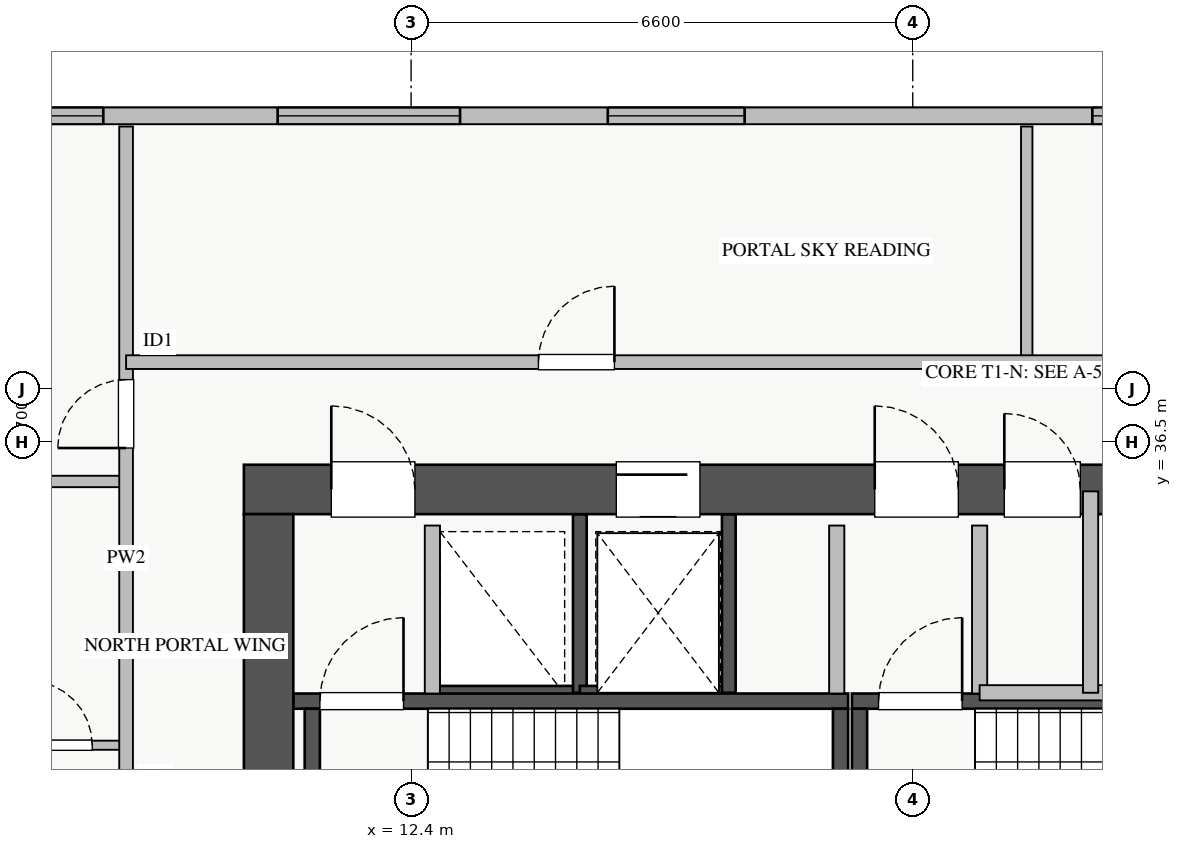
"""IFC4 building model, lengths in metres.
Left out: names, types, materials, properties, quantities, classifications, styles, units other than length and angle.
Written with IfcOpenShell. Run it as: python <this file> out.ifc"""

import sys

from ifc_helpers import new_model, si_unit, direction, frame, frame_2d, origin, place, context, subcontext, project, spatial, rectangle, extrude, source, transform, mapped, element, fill, save


model = new_model("IFC4")
c1 = context("Model", 3, precision=1e-05, world=origin(), true_north=direction((0.0, 1.0)))
c2 = subcontext(c1, "Body", "Model", "MODEL_VIEW")
j1 = project(units=[si_unit("LENGTHUNIT", "METRE"), si_unit("PLANEANGLEUNIT", "RADIAN")], contexts=[c1])
p1 = place(None, origin())
s1 = spatial("IfcSite", under=j1, at=p1, CompositionType="ELEMENT")
p2 = place(p1, origin())
s2 = spatial("IfcBuilding", under=s1, at=p2, CompositionType="ELEMENT")
p3 = place(p2, frame((0.0, 0.0, 153.5)))
s3 = spatial("IfcBuildingStorey", under=s2, at=p3, CompositionType="ELEMENT", Elevation=153.5)
p4 = place(p3, frame((12.68, 33.2, 0.0), z_axis=(0.0, 0.0, 1.0), x_axis=(1.0, 0.0, 0.0)))
e1 = element("IfcWall", 1, at=p4, inside=s3, PredefinedType="SHEAR", context=c2, shape_type="SweptSolid", body=[
    extrude(rectangle(XDim=1.94, YDim=0.18, at=frame_2d((0.97, 0.0))), origin(), (0.0, 0.0, 1.0), 3.07),
])
p5 = place(p3, frame((14.62, 33.2, 0.0), z_axis=(0.0, 0.0, 1.0), x_axis=(0.0, 1.0, 0.0)))
e2 = element("IfcWall", 2, at=p5, inside=s3, PredefinedType="SHEAR", context=c2, shape_type="SweptSolid", body=[
    extrude(rectangle(XDim=2.35, YDim=0.18, at=frame_2d((1.175, 0.0))), origin(), (0.0, 0.0, 1.0), 3.07),
])
p6 = place(p3, frame((14.62, 33.2, 0.0), z_axis=(0.0, 0.0, 1.0), x_axis=(1.0, 0.0, 0.0)))
e3 = element("IfcWall", 3, at=p6, inside=s3, PredefinedType="SHEAR", context=c2, shape_type="SweptSolid", body=[
    extrude(rectangle(XDim=1.96, YDim=0.18, at=frame_2d((0.98, 0.0))), origin(), (0.0, 0.0, 1.0), 3.07),
])
p7 = place(p3, frame((16.58, 33.2, 0.0), z_axis=(0.0, 0.0, 1.0), x_axis=(0.0, 1.0, 0.0)))
e4 = element("IfcWall", 4, at=p7, inside=s3, PredefinedType="SHEAR", context=c2, shape_type="SweptSolid", body=[
    extrude(rectangle(XDim=2.35, YDim=0.18, at=frame_2d((1.175, 0.0))), origin(), (0.0, 0.0, 1.0), 3.07),
])
p8 = place(p3, frame((10.85, 33.09, 0.0), z_axis=(0.0, 0.0, 1.0), x_axis=(1.0, 0.0, 0.0)))
e5 = element("IfcWall", 5, at=p8, inside=s3, PredefinedType="SHEAR", context=c2, shape_type="SweptSolid", body=[
    extrude(rectangle(XDim=7.3, YDim=0.2, at=frame_2d((3.65, 0.0))), origin(), (0.0, 0.0, 1.0), 3.25),
])
p9 = place(p8, frame((0.35, 0.0, 0.0)))
e6 = element("IfcOpeningElement", 6, at=p9, cuts=e5, PredefinedType="OPENING", context=c2, shape_type="SweptSolid", body=[
    extrude(rectangle(XDim=1.1, YDim=2.05, at=frame_2d((0.55, 1.025))), frame((0.0, 0.11, 0.0), z_axis=(0.0, -1.0, 0.0), x_axis=(1.0, 0.0, 0.0)), (0.0, 0.0, 1.0), 0.22),
])
for number, where, z_axis, x_axis in (
    (7, (11.1, 30.05, 0.0), (0.0, 0.0, 1.0), (0.0, 1.0, 0.0)),
    (8, (18.05, 30.05, 0.0), (0.0, 0.0, 1.0), (0.0, 1.0, 0.0)),
):
    element("IfcWall", number, at=place(p3, frame(where, z_axis=z_axis, x_axis=x_axis)), inside=s3, PredefinedType="SHEAR", context=c2, shape_type="SweptSolid", body=[
        extrude(rectangle(XDim=2.94, YDim=0.2, at=frame_2d((1.47, 0.0))), origin(), (0.0, 0.0, 1.0), 3.25),
    ])
p10 = place(p3, frame((18.2, 33.09, 0.0), z_axis=(0.0, 0.0, 1.0), x_axis=(1.0, 0.0, 0.0)))
e9 = element("IfcWall", 9, at=p10, inside=s3, PredefinedType="SHEAR", context=c2, shape_type="SweptSolid", body=[
    extrude(rectangle(XDim=7.15, YDim=0.2, at=frame_2d((3.575, 0.0))), origin(), (0.0, 0.0, 1.0), 3.25),
])
p11 = place(p10, frame((0.35, 0.0, 0.0)))
e10 = element("IfcOpeningElement", 10, at=p11, cuts=e9, PredefinedType="OPENING", context=c2, shape_type="SweptSolid", body=[
    extrude(rectangle(XDim=1.1, YDim=2.05, at=frame_2d((0.55, 1.025))), frame((0.0, 0.11, 0.0), z_axis=(0.0, -1.0, 0.0), x_axis=(1.0, 0.0, 0.0)), (0.0, 0.0, 1.0), 0.22),
])
p12 = place(p3, frame((18.3, 30.05, 0.0), z_axis=(0.0, 0.0, 1.0), x_axis=(0.0, 1.0, 0.0)))
e11 = element("IfcWall", 11, at=p12, inside=s3, PredefinedType="SHEAR", context=c2, shape_type="SweptSolid", body=[
    extrude(rectangle(XDim=2.94, YDim=0.2, at=frame_2d((1.47, 0.0))), origin(), (0.0, 0.0, 1.0), 3.25),
])
p13 = place(p3, frame((10.2, 35.875, 0.0), z_axis=(0.0, 0.0, 1.0), x_axis=(1.0, 0.0, 0.0)))
e12 = element("IfcWall", 12, at=p13, inside=s3, PredefinedType="SHEAR", context=c2, shape_type="SweptSolid", body=[
    extrude(rectangle(XDim=17.6, YDim=0.65, at=frame_2d((8.8, 0.0))), origin(), (0.0, 0.0, 1.0), 3.25),
])
p14 = place(p13, frame((1.15, 0.0, 0.0)))
e13 = element("IfcOpeningElement", 13, at=p14, cuts=e12, PredefinedType="OPENING", context=c2, shape_type="SweptSolid", body=[
    extrude(rectangle(XDim=1.1, YDim=2.05, at=frame_2d((0.55, 1.025))), frame((0.0, 0.335, 0.0), z_axis=(0.0, -1.0, 0.0), x_axis=(1.0, 0.0, 0.0)), (0.0, 0.0, 1.0), 0.67),
])
p15 = place(p13, frame((8.3, 0.0, 0.0)))
e14 = element("IfcOpeningElement", 14, at=p15, cuts=e12, PredefinedType="OPENING", context=c2, shape_type="SweptSolid", body=[
    extrude(rectangle(XDim=1.1, YDim=2.05, at=frame_2d((0.55, 1.025))), frame((0.0, 0.335, 0.0), z_axis=(0.0, -1.0, 0.0), x_axis=(1.0, 0.0, 0.0)), (0.0, 0.0, 1.0), 0.67),
])
p16 = place(p13, frame((4.9, 0.0, 0.0)))
e15 = element("IfcOpeningElement", 15, at=p16, cuts=e12, PredefinedType="OPENING", context=c2, shape_type="SweptSolid", body=[
    extrude(rectangle(XDim=1.1, YDim=2.05, at=frame_2d((0.55, 1.025))), frame((0.0, 0.335, 0.0), z_axis=(0.0, -1.0, 0.0), x_axis=(1.0, 0.0, 0.0)), (0.0, 0.0, 1.0), 0.67),
])
p17 = place(p13, frame((14.74, 0.0, 0.0)))
e16 = element("IfcOpeningElement", 16, at=p17, cuts=e12, PredefinedType="OPENING", context=c2, shape_type="SweptSolid", body=[
    extrude(rectangle(XDim=1.0, YDim=2.05, at=frame_2d((0.5, 1.025))), frame((0.0, 0.335, 0.0), z_axis=(0.0, -1.0, 0.0), x_axis=(1.0, 0.0, 0.0)), (0.0, 0.0, 1.0), 0.67),
])
p18 = place(p13, frame((10.005, 0.0, 0.0)))
e17 = element("IfcOpeningElement", 17, at=p18, cuts=e12, PredefinedType="OPENING", context=c2, shape_type="SweptSolid", body=[
    extrude(rectangle(XDim=1.0, YDim=2.05, at=frame_2d((0.5, 1.025))), frame((0.0, 0.335, 0.0), z_axis=(0.0, -1.0, 0.0), x_axis=(1.0, 0.0, 0.0)), (0.0, 0.0, 1.0), 0.67),
])
p19 = place(p13, frame((11.55, 0.0, 0.0)))
e18 = element("IfcOpeningElement", 18, at=p19, cuts=e12, PredefinedType="OPENING", context=c2, shape_type="SweptSolid", body=[
    extrude(rectangle(XDim=1.0, YDim=2.05, at=frame_2d((0.5, 1.025))), frame((0.0, 0.335, 0.0), z_axis=(0.0, -1.0, 0.0), x_axis=(1.0, 0.0, 0.0)), (0.0, 0.0, 1.0), 0.67),
])
p20 = place(p13, frame((13.215, 0.0, 0.0)))
e19 = element("IfcOpeningElement", 19, at=p20, cuts=e12, PredefinedType="OPENING", context=c2, shape_type="SweptSolid", body=[
    extrude(rectangle(XDim=1.0, YDim=2.05, at=frame_2d((0.5, 1.025))), frame((0.0, 0.335, 0.0), z_axis=(0.0, -1.0, 0.0), x_axis=(1.0, 0.0, 0.0)), (0.0, 0.0, 1.0), 0.67),
])
p21 = place(p3, frame((10.525, 29.65, 0.0), z_axis=(0.0, 0.0, 1.0), x_axis=(0.0, 1.0, 0.0)))
e20 = element("IfcWall", 20, at=p21, inside=s3, PredefinedType="SHEAR", context=c2, shape_type="SweptSolid", body=[
    extrude(rectangle(XDim=5.9, YDim=0.65, at=frame_2d((2.95, 0.0))), origin(), (0.0, 0.0, 1.0), 3.25),
])
p22 = place(p3, frame((6.55, 40.79, 0.0), z_axis=(0.0, 0.0, 1.0), x_axis=(1.0, 0.0, 0.0)))
e21 = element("IfcWall", 21, at=p22, inside=s3, PredefinedType="STANDARD", context=c2, shape_type="SweptSolid", body=[
    extrude(rectangle(XDim=24.9, YDim=0.22, at=frame_2d((12.45, 0.0))), origin(), (0.0, 0.0, 1.0), 2.61),
])
p23 = place(p22, frame((0.3, 0.0, 0.9)))
e22 = element("IfcOpeningElement", 22, at=p23, cuts=e21, PredefinedType="OPENING", context=c2, shape_type="SweptSolid", body=[
    extrude(rectangle(XDim=1.5, YDim=1.5, at=frame_2d((0.75, 0.75))), frame((0.0, 0.12, 0.0), z_axis=(0.0, -1.0, 0.0), x_axis=(1.0, 0.0, 0.0)), (0.0, 0.0, 1.0), 0.24),
])
p24 = place(p22, frame((8.438, 0.0, 0.9)))
e23 = element("IfcOpeningElement", 23, at=p24, cuts=e21, PredefinedType="OPENING", context=c2, shape_type="SweptSolid", body=[
    extrude(rectangle(XDim=1.8, YDim=1.45, at=frame_2d((0.9, 0.725))), frame((0.0, 0.12, 0.0), z_axis=(0.0, -1.0, 0.0), x_axis=(1.0, 0.0, 0.0)), (0.0, 0.0, 1.0), 0.24),
])
p25 = place(p22, frame((14.813, 0.0, 0.9)))
e24 = element("IfcOpeningElement", 24, at=p25, cuts=e21, PredefinedType="OPENING", context=c2, shape_type="SweptSolid", body=[
    extrude(rectangle(XDim=1.5, YDim=1.45, at=frame_2d((0.75, 0.725))), frame((0.0, 0.12, 0.0), z_axis=(0.0, -1.0, 0.0), x_axis=(1.0, 0.0, 0.0)), (0.0, 0.0, 1.0), 0.24),
])
p26 = place(p22, frame((20.738, 0.0, 0.9)))
e25 = element("IfcOpeningElement", 25, at=p26, cuts=e21, PredefinedType="OPENING", context=c2, shape_type="SweptSolid", body=[
    extrude(rectangle(XDim=2.1, YDim=1.48, at=frame_2d((1.05, 0.74))), frame((0.0, 0.12, 0.0), z_axis=(0.0, -1.0, 0.0), x_axis=(1.0, 0.0, 0.0)), (0.0, 0.0, 1.0), 0.24),
])
p27 = place(p22, frame((4.094, 0.0, 0.9)))
e26 = element("IfcOpeningElement", 26, at=p27, cuts=e21, PredefinedType="OPENING", context=c2, shape_type="SweptSolid", body=[
    extrude(rectangle(XDim=2.4, YDim=1.5, at=frame_2d((1.2, 0.75))), frame((0.0, 0.12, 0.0), z_axis=(0.0, -1.0, 0.0), x_axis=(1.0, 0.0, 0.0)), (0.0, 0.0, 1.0), 0.24),
])
for number, where, z_axis, x_axis in (
    (27, (12.68, 33.19, 0.0), (0.0, 0.0, 1.0), (0.0, 1.0, 0.0)),
    (28, (18.0, 33.19, 0.0), (0.0, 0.0, 1.0), (0.0, 1.0, 0.0)),
    (29, (19.88, 33.19, 0.0), (0.0, 0.0, 1.0), (0.0, 1.0, 0.0)),
):
    element("IfcWall", number, at=place(p3, frame(where, z_axis=z_axis, x_axis=x_axis)), inside=s3, PredefinedType="PARTITIONING", context=c2, shape_type="SweptSolid", body=[
        extrude(rectangle(XDim=2.21, YDim=0.2, at=frame_2d((1.105, 0.0))), origin(), (0.0, 0.0, 1.0), 3.07),
    ])
p28 = place(p3, frame((19.88, 33.2, 0.0), z_axis=(0.0, 0.0, 1.0), x_axis=(1.0, 0.0, 0.0)))
e30 = element("IfcWall", 30, at=p28, inside=s3, PredefinedType="PARTITIONING", context=c2, shape_type="SweptSolid", body=[
    extrude(rectangle(XDim=1.87, YDim=0.2, at=frame_2d((0.935, 0.0))), origin(), (0.0, 0.0, 1.0), 3.07),
])
p29 = place(p3, frame((21.34, 33.2, 0.0), z_axis=(0.0, 0.0, 1.0), x_axis=(0.0, 1.0, 0.0)))
e31 = element("IfcWall", 31, at=p29, inside=s3, PredefinedType="PARTITIONING", context=c2, shape_type="SweptSolid", body=[
    extrude(rectangle(XDim=2.65, YDim=0.2, at=frame_2d((1.325, 0.0))), origin(), (0.0, 0.0, 1.0), 3.07),
])
p30 = place(p3, frame((1.35, 32.51, 0.0), z_axis=(0.0, 0.0, 1.0), x_axis=(1.0, 0.0, 0.0)))
e32 = element("IfcWall", 32, at=p30, inside=s3, PredefinedType="PLUMBINGWALL", context=c2, shape_type="SweptSolid", body=[
    extrude(rectangle(XDim=7.3, YDim=0.12, at=frame_2d((3.65, 0.0))), origin(), (0.0, 0.0, 1.0), 3.07),
])
p31 = place(p30, frame((1.19, 0.0, 0.0)))
e33 = element("IfcOpeningElement", 33, at=p31, cuts=e32, PredefinedType="OPENING", context=c2, shape_type="SweptSolid", body=[
    extrude(rectangle(XDim=0.9, YDim=2.05, at=frame_2d((0.45, 1.025))), frame((0.0, 0.07, 0.0), z_axis=(0.0, -1.0, 0.0), x_axis=(1.0, 0.0, 0.0)), (0.0, 0.0, 1.0), 0.14),
])
p32 = place(p30, frame((3.97, 0.0, 0.0)))
e34 = element("IfcOpeningElement", 34, at=p32, cuts=e32, PredefinedType="OPENING", context=c2, shape_type="SweptSolid", body=[
    extrude(rectangle(XDim=0.9, YDim=2.05, at=frame_2d((0.45, 1.025))), frame((0.0, 0.07, 0.0), z_axis=(0.0, -1.0, 0.0), x_axis=(1.0, 0.0, 0.0)), (0.0, 0.0, 1.0), 0.14),
])
p33 = place(p30, frame((6.005, 0.0, 0.0)))
e35 = element("IfcOpeningElement", 35, at=p33, cuts=e32, PredefinedType="OPENING", context=c2, shape_type="SweptSolid", body=[
    extrude(rectangle(XDim=0.85, YDim=2.05, at=frame_2d((0.425, 1.025))), frame((0.0, 0.07, 0.0), z_axis=(0.0, -1.0, 0.0), x_axis=(1.0, 0.0, 0.0)), (0.0, 0.0, 1.0), 0.14),
])
p34 = place(p3, frame((1.35, 35.98, 0.0), z_axis=(0.0, 0.0, 1.0), x_axis=(1.0, 0.0, 0.0)))
e36 = element("IfcWall", 36, at=p34, inside=s3, PredefinedType="PARTITIONING", context=c2, shape_type="SweptSolid", body=[
    extrude(rectangle(XDim=7.3, YDim=0.15, at=frame_2d((3.65, 0.0))), origin(), (0.0, 0.0, 1.0), 3.07),
])
p35 = place(p3, frame((8.65, 29.3, 0.0), z_axis=(0.0, 0.0, 1.0), x_axis=(0.0, 1.0, 0.0)))
e37 = element("IfcWall", 37, at=p35, inside=s3, PredefinedType="PARTITIONING", context=c2, shape_type="SweptSolid", body=[
    extrude(rectangle(XDim=11.35, YDim=0.18, at=frame_2d((5.675, 0.0))), origin(), (0.0, 0.0, 1.0), 3.07),
])
p36 = place(p35, frame((0.915, 0.0, 0.0)))
e38 = element("IfcOpeningElement", 38, at=p36, cuts=e37, PredefinedType="OPENING", context=c2, shape_type="SweptSolid", body=[
    extrude(rectangle(XDim=1.0, YDim=2.05, at=frame_2d((0.5, 1.025))), frame((0.0, 0.1, 0.0), z_axis=(0.0, -1.0, 0.0), x_axis=(1.0, 0.0, 0.0)), (0.0, 0.0, 1.0), 0.2),
])
p37 = place(p35, frame((7.12, 0.0, 0.0)))
e39 = element("IfcOpeningElement", 39, at=p37, cuts=e37, PredefinedType="OPENING", context=c2, shape_type="SweptSolid", body=[
    extrude(rectangle(XDim=0.9, YDim=2.05, at=frame_2d((0.45, 1.025))), frame((0.0, 0.1, 0.0), z_axis=(0.0, -1.0, 0.0), x_axis=(1.0, 0.0, 0.0)), (0.0, 0.0, 1.0), 0.2),
])
p38 = place(p3, frame((20.5, 37.55, 0.0), z_axis=(0.0, 0.0, 1.0), x_axis=(0.0, 1.0, 0.0)))
e40 = element("IfcWall", 40, at=p38, inside=s3, PredefinedType="PARTITIONING", context=c2, shape_type="SweptSolid", body=[
    extrude(rectangle(XDim=3.1, YDim=0.15, at=frame_2d((1.55, 0.0))), origin(), (0.0, 0.0, 1.0), 3.07),
])
p39 = place(p3, frame((8.65, 37.55, 0.0), z_axis=(0.0, 0.0, 1.0), x_axis=(1.0, 0.0, 0.0)))
e41 = element("IfcWall", 41, at=p39, inside=s3, PredefinedType="PARTITIONING", context=c2, shape_type="SweptSolid", body=[
    extrude(rectangle(XDim=23.8, YDim=0.18, at=frame_2d((11.9, 0.0))), origin(), (0.0, 0.0, 1.0), 3.07),
])
p40 = place(p39, frame((5.425, 0.0, 0.0)))
e42 = element("IfcOpeningElement", 42, at=p40, cuts=e41, PredefinedType="OPENING", context=c2, shape_type="SweptSolid", body=[
    extrude(rectangle(XDim=1.0, YDim=2.05, at=frame_2d((0.5, 1.025))), frame((0.0, 0.1, 0.0), z_axis=(0.0, -1.0, 0.0), x_axis=(1.0, 0.0, 0.0)), (0.0, 0.0, 1.0), 0.2),
])
p41 = place(p39, frame((17.325, 0.0, 0.0)))
e43 = element("IfcOpeningElement", 43, at=p41, cuts=e41, PredefinedType="OPENING", context=c2, shape_type="SweptSolid", body=[
    extrude(rectangle(XDim=1.0, YDim=2.05, at=frame_2d((0.5, 1.025))), frame((0.0, 0.1, 0.0), z_axis=(0.0, -1.0, 0.0), x_axis=(1.0, 0.0, 0.0)), (0.0, 0.0, 1.0), 0.2),
])
m1 = source(origin(), c2, "Body", "SweptSolid", [
    extrude(rectangle(XDim=1.5, YDim=1.5, at=frame_2d((0.75, 0.75))), frame((0.0, 0.03, 0.0), z_axis=(0.0, -1.0, 0.0), x_axis=(1.0, 0.0, 0.0)), (0.0, 0.0, 1.0), 0.06),
])
p42 = place(p23, origin())
e44 = element("IfcWindow", 44, at=p42, inside=s3, PartitioningType="TRIPLE_PANEL_VERTICAL", PredefinedType="WINDOW", context=c2, shape_type="MappedRepresentation", body=[
    mapped(m1, transform((0.0, 0.0, 0.0), x_axis=(1.0, 0.0, 0.0), y_axis=(0.0, 1.0, 0.0), z_axis=(0.0, 0.0, 1.0), scale=1.0)),
])
fill(e22, e44)
m2 = source(origin(), c2, "Body", "SweptSolid", [
    extrude(rectangle(XDim=1.8, YDim=1.45, at=frame_2d((0.9, 0.725))), frame((0.0, 0.03, 0.0), z_axis=(0.0, -1.0, 0.0), x_axis=(1.0, 0.0, 0.0)), (0.0, 0.0, 1.0), 0.06),
])
p43 = place(p24, origin())
e45 = element("IfcWindow", 45, at=p43, inside=s3, PartitioningType="DOUBLE_PANEL_VERTICAL", PredefinedType="WINDOW", context=c2, shape_type="MappedRepresentation", body=[
    mapped(m2, transform((0.0, 0.0, 0.0), x_axis=(1.0, 0.0, 0.0), y_axis=(0.0, 1.0, 0.0), z_axis=(0.0, 0.0, 1.0), scale=1.0)),
])
fill(e23, e45)
m3 = source(origin(), c2, "Body", "SweptSolid", [
    extrude(rectangle(XDim=1.5, YDim=1.45, at=frame_2d((0.75, 0.725))), frame((0.0, 0.03, 0.0), z_axis=(0.0, -1.0, 0.0), x_axis=(1.0, 0.0, 0.0)), (0.0, 0.0, 1.0), 0.06),
])
p44 = place(p25, origin())
e46 = element("IfcWindow", 46, at=p44, inside=s3, PartitioningType="DOUBLE_PANEL_VERTICAL", PredefinedType="WINDOW", context=c2, shape_type="MappedRepresentation", body=[
    mapped(m3, transform((0.0, 0.0, 0.0), x_axis=(1.0, 0.0, 0.0), y_axis=(0.0, 1.0, 0.0), z_axis=(0.0, 0.0, 1.0), scale=1.0)),
])
fill(e24, e46)
m4 = source(origin(), c2, "Body", "SweptSolid", [
    extrude(rectangle(XDim=1.1, YDim=2.05, at=frame_2d((0.55, 1.025))), frame((0.0, 0.025, 0.0), z_axis=(0.0, -1.0, 0.0), x_axis=(1.0, 0.0, 0.0)), (0.0, 0.0, 1.0), 0.05),
])
p45 = place(p14, origin())
e47 = element("IfcDoor", 47, at=p45, inside=s3, OperationType="SINGLE_SWING_LEFT", PredefinedType="DOOR", context=c2, shape_type="MappedRepresentation", body=[
    mapped(m4, transform((0.0, 0.0, 0.0), x_axis=(1.0, 0.0, 0.0), y_axis=(0.0, 1.0, 0.0), z_axis=(0.0, 0.0, 1.0), scale=1.0)),
])
fill(e13, e47)
p46 = place(p9, origin())
e48 = element("IfcDoor", 48, at=p46, inside=s3, OperationType="SINGLE_SWING_RIGHT", PredefinedType="DOOR", context=c2, shape_type="MappedRepresentation", body=[
    mapped(m4, transform((0.0, 0.0, 0.0), x_axis=(1.0, 0.0, 0.0), y_axis=(0.0, 1.0, 0.0), z_axis=(0.0, 0.0, 1.0), scale=1.0)),
])
fill(e6, e48)
p47 = place(p15, origin())
e49 = element("IfcDoor", 49, at=p47, inside=s3, OperationType="SINGLE_SWING_LEFT", PredefinedType="DOOR", context=c2, shape_type="MappedRepresentation", body=[
    mapped(m4, transform((0.0, 0.0, 0.0), x_axis=(1.0, 0.0, 0.0), y_axis=(0.0, 1.0, 0.0), z_axis=(0.0, 0.0, 1.0), scale=1.0)),
])
fill(e14, e49)
p48 = place(p11, origin())
e50 = element("IfcDoor", 50, at=p48, inside=s3, OperationType="SINGLE_SWING_RIGHT", PredefinedType="DOOR", context=c2, shape_type="MappedRepresentation", body=[
    mapped(m4, transform((0.0, 0.0, 0.0), x_axis=(1.0, 0.0, 0.0), y_axis=(0.0, 1.0, 0.0), z_axis=(0.0, 0.0, 1.0), scale=1.0)),
])
fill(e10, e50)
p49 = place(p16, origin())
e51 = element("IfcDoor", 51, at=p49, inside=s3, OperationType="SLIDING_TO_LEFT", PredefinedType="DOOR", context=c2, shape_type="MappedRepresentation", body=[
    mapped(m4, transform((0.0, 0.0, 0.0), x_axis=(1.0, 0.0, 0.0), y_axis=(0.0, 1.0, 0.0), z_axis=(0.0, 0.0, 1.0), scale=1.0)),
])
fill(e15, e51)
m5 = source(origin(), c2, "Body", "SweptSolid", [
    extrude(rectangle(XDim=1.0, YDim=2.05, at=frame_2d((0.5, 1.025))), frame((0.0, 0.025, 0.0), z_axis=(0.0, -1.0, 0.0), x_axis=(1.0, 0.0, 0.0)), (0.0, 0.0, 1.0), 0.05),
])
p50 = place(p18, origin())
e52 = element("IfcDoor", 52, at=p50, inside=s3, OperationType="SINGLE_SWING_LEFT", PredefinedType="DOOR", context=c2, shape_type="MappedRepresentation", body=[
    mapped(m5, transform((0.0, 0.0, 0.0), x_axis=(1.0, 0.0, 0.0), y_axis=(0.0, 1.0, 0.0), z_axis=(0.0, 0.0, 1.0), scale=1.0)),
])
fill(e17, e52)
m6 = source(origin(), c2, "Body", "SweptSolid", [
    extrude(rectangle(XDim=0.85, YDim=2.05, at=frame_2d((0.425, 1.025))), frame((0.0, 0.025, 0.0), z_axis=(0.0, -1.0, 0.0), x_axis=(1.0, 0.0, 0.0)), (0.0, 0.0, 1.0), 0.05),
])
p51 = place(p33, origin())
e53 = element("IfcDoor", 53, at=p51, inside=s3, OperationType="SINGLE_SWING_LEFT", PredefinedType="DOOR", context=c2, shape_type="MappedRepresentation", body=[
    mapped(m6, transform((0.0, 0.0, 0.0), x_axis=(1.0, 0.0, 0.0), y_axis=(0.0, 1.0, 0.0), z_axis=(0.0, 0.0, 1.0), scale=1.0)),
])
fill(e35, e53)
m7 = source(origin(), c2, "Body", "SweptSolid", [
    extrude(rectangle(XDim=0.9, YDim=2.05, at=frame_2d((0.45, 1.025))), frame((0.0, 0.025, 0.0), z_axis=(0.0, -1.0, 0.0), x_axis=(1.0, 0.0, 0.0)), (0.0, 0.0, 1.0), 0.05),
])
p52 = place(p37, origin())
e54 = element("IfcDoor", 54, at=p52, inside=s3, OperationType="SINGLE_SWING_LEFT", PredefinedType="DOOR", context=c2, shape_type="MappedRepresentation", body=[
    mapped(m7, transform((0.0, 0.0, 0.0), x_axis=(1.0, 0.0, 0.0), y_axis=(0.0, 1.0, 0.0), z_axis=(0.0, 0.0, 1.0), scale=1.0)),
])
fill(e39, e54)
p53 = place(p40, origin())
e55 = element("IfcDoor", 55, at=p53, inside=s3, OperationType="SINGLE_SWING_RIGHT", PredefinedType="DOOR", context=c2, shape_type="MappedRepresentation", body=[
    mapped(m5, transform((0.0, 0.0, 0.0), x_axis=(1.0, 0.0, 0.0), y_axis=(0.0, 1.0, 0.0), z_axis=(0.0, 0.0, 1.0), scale=1.0)),
])
fill(e42, e55)
m8 = source(origin(), c2, "Body", "SweptSolid", [
    extrude(rectangle(XDim=2.4, YDim=1.5, at=frame_2d((1.2, 0.75))), frame((0.0, 0.03, 0.0), z_axis=(0.0, -1.0, 0.0), x_axis=(1.0, 0.0, 0.0)), (0.0, 0.0, 1.0), 0.06),
])
p54 = place(p27, origin())
e56 = element("IfcWindow", 56, at=p54, inside=s3, PartitioningType="TRIPLE_PANEL_VERTICAL", PredefinedType="WINDOW", context=c2, shape_type="MappedRepresentation", body=[
    mapped(m8, transform((0.0, 0.0, 0.0), x_axis=(1.0, 0.0, 0.0), y_axis=(0.0, 1.0, 0.0), z_axis=(0.0, 0.0, 1.0), scale=1.0)),
])
fill(e26, e56)
save(model, sys.argv[1])
